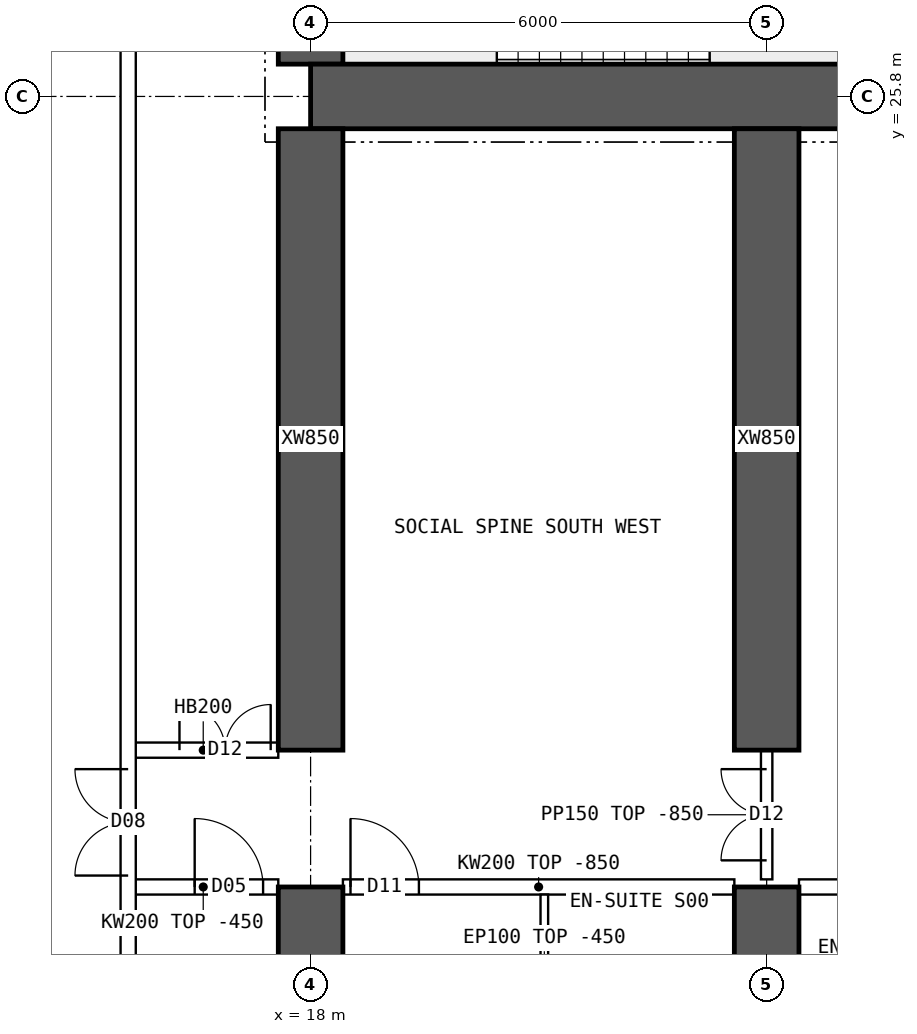
"""IFC4 building model, lengths in metres.
Left out: names, types, materials, properties, quantities, classifications, styles, units other than length and angle.
Written with IfcOpenShell. Run it as: python <this file> out.ifc"""

import sys

from ifc_helpers import new_model, si_unit, direction, frame, frame_2d, origin, place, context, subcontext, project, spatial, polyline, rectangle, outline, extrude, element, fill, save


model = new_model("IFC4")
c1 = context("Model", 3, precision=1e-05, world=origin(), true_north=direction((0.0, 1.0)))
c2 = subcontext(c1, "Body", "Model", "MODEL_VIEW")
j1 = project(units=[si_unit("LENGTHUNIT", "METRE"), si_unit("PLANEANGLEUNIT", "RADIAN")], contexts=[c1])
p1 = place(None, origin())
s1 = spatial("IfcSite", under=j1, at=p1, CompositionType="ELEMENT")
p2 = place(p1, origin())
s2 = spatial("IfcBuilding", under=s1, at=p2, CompositionType="ELEMENT")
p3 = place(p2, frame((0.0, 0.0, 189.85)))
s3 = spatial("IfcBuildingStorey", under=s2, at=p3, CompositionType="ELEMENT", Elevation=189.85)
p4 = place(p3, frame((18.0, 25.8, 0.0), z_axis=(0.0, 0.0, 1.0), x_axis=(1.0, 0.0, 0.0)))
e1 = element("IfcWall", 1, at=p4, inside=s3, PredefinedType="SHEAR", context=c2, shape_type="SweptSolid", body=[
    extrude(rectangle(XDim=48.0, YDim=0.85, at=frame_2d((24.0, 0.0))), origin(), (0.0, 0.0, 1.0), 3.75),
])
p5 = place(p3, frame((18.0, 26.225, 0.0), z_axis=(0.0, 0.0, 1.0), x_axis=(0.0, 1.0, 0.0)))
e2 = element("IfcWall", 2, at=p5, inside=s3, PredefinedType="SHEAR", context=c2, shape_type="SweptSolid", body=[
    extrude(rectangle(XDim=11.55, YDim=0.85, at=frame_2d((5.775, 0.0))), origin(), (0.0, 0.0, 1.0), 3.75),
])
p6 = place(p5, frame((5.075, 0.0, 0.0)))
e3 = element("IfcOpeningElement", 3, at=p6, cuts=e2, PredefinedType="OPENING", context=c2, shape_type="SweptSolid", body=[
    extrude(rectangle(XDim=1.2, YDim=2.1, at=frame_2d((0.6, 1.05))), frame((0.0, 0.435, 0.0), z_axis=(0.0, -1.0, 0.0), x_axis=(1.0, 0.0, 0.0)), (0.0, 0.0, 1.0), 0.87),
])
p7 = place(p3, frame((18.0, 10.0, 0.0), z_axis=(0.0, 0.0, 1.0), x_axis=(0.0, 1.0, 0.0)))
e4 = element("IfcWall", 4, at=p7, inside=s3, PredefinedType="SHEAR", context=c2, shape_type="SweptSolid", body=[
    extrude(rectangle(XDim=5.4, YDim=0.85, at=frame_2d((2.7, 0.0))), origin(), (0.0, 0.0, 1.0), 3.75),
])
p8 = place(p3, frame((18.0, 17.2, 0.0), z_axis=(0.0, 0.0, 1.0), x_axis=(0.0, 1.0, 0.0)))
e5 = element("IfcWall", 5, at=p8, inside=s3, PredefinedType="SHEAR", context=c2, shape_type="SweptSolid", body=[
    extrude(rectangle(XDim=8.175, YDim=0.85, at=frame_2d((4.087, 0.0))), origin(), (0.0, 0.0, 1.0), 3.75),
])
p9 = place(p3, frame((24.0, 10.0, 0.0), z_axis=(0.0, 0.0, 1.0), x_axis=(0.0, 1.0, 0.0)))
e6 = element("IfcWall", 6, at=p9, inside=s3, PredefinedType="SHEAR", context=c2, shape_type="SweptSolid", body=[
    extrude(rectangle(XDim=5.4, YDim=0.85, at=frame_2d((2.7, 0.0))), origin(), (0.0, 0.0, 1.0), 3.75),
])
p10 = place(p3, frame((24.0, 17.2, 0.0), z_axis=(0.0, 0.0, 1.0), x_axis=(0.0, 1.0, 0.0)))
e7 = element("IfcWall", 7, at=p10, inside=s3, PredefinedType="SHEAR", context=c2, shape_type="SweptSolid", body=[
    extrude(rectangle(XDim=8.175, YDim=0.85, at=frame_2d((4.087, 0.0))), origin(), (0.0, 0.0, 1.0), 3.75),
])
p11 = place(p3, frame((15.6, 15.4, 0.0), z_axis=(0.0, 0.0, 1.0), x_axis=(1.0, 0.0, 0.0)))
e8 = element("IfcWall", 8, at=p11, inside=s3, PredefinedType="SOLIDWALL", context=c2, shape_type="SweptSolid", body=[
    extrude(rectangle(XDim=1.975, YDim=0.2, at=frame_2d((0.987, 0.0))), origin(), (0.0, 0.0, 1.0), 3.3),
])
p12 = place(p11, frame((0.875, 0.0, 0.0)))
e9 = element("IfcOpeningElement", 9, at=p12, cuts=e8, PredefinedType="OPENING", context=c2, shape_type="SweptSolid", body=[
    extrude(rectangle(XDim=0.9, YDim=2.1, at=frame_2d((0.45, 1.05))), frame((0.0, 0.11, 0.0), z_axis=(0.0, -1.0, 0.0), x_axis=(1.0, 0.0, 0.0)), (0.0, 0.0, 1.0), 0.22),
])
p13 = place(p3, frame((15.6, 17.2, 0.0), z_axis=(0.0, 0.0, 1.0), x_axis=(1.0, 0.0, 0.0)))
e10 = element("IfcWall", 10, at=p13, inside=s3, PredefinedType="SOLIDWALL", context=c2, shape_type="SweptSolid", body=[
    extrude(rectangle(XDim=1.975, YDim=0.2, at=frame_2d((0.987, 0.0))), origin(), (0.0, 0.0, 1.0), 3.3),
])
p14 = place(p13, frame((0.675, 0.0, 0.0)))
e11 = element("IfcOpeningElement", 11, at=p14, cuts=e10, PredefinedType="OPENING", context=c2, shape_type="SweptSolid", body=[
    extrude(rectangle(XDim=1.2, YDim=2.1, at=frame_2d((0.6, 1.05))), frame((0.0, 0.11, 0.0), z_axis=(0.0, -1.0, 0.0), x_axis=(1.0, 0.0, 0.0)), (0.0, 0.0, 1.0), 0.22),
])
p15 = place(p3, frame((18.425, 15.4, 0.0), z_axis=(0.0, 0.0, 1.0), x_axis=(1.0, 0.0, 0.0)))
e12 = element("IfcWall", 12, at=p15, inside=s3, PredefinedType="SOLIDWALL", context=c2, shape_type="SweptSolid", body=[
    extrude(outline(polyline([(0.0, 0.0), (5.15, 0.0), (5.15, 2.9), (0.0, 2.9), (0.0, 0.0)])), frame((0.0, 0.1, 0.0), z_axis=(0.0, -1.0, 0.0), x_axis=(1.0, 0.0, 0.0)), (0.0, 0.0, 1.0), 0.2),
])
p16 = place(p15, frame((0.1, 0.0, 0.0)))
e13 = element("IfcOpeningElement", 13, at=p16, cuts=e12, PredefinedType="OPENING", context=c2, shape_type="SweptSolid", body=[
    extrude(rectangle(XDim=0.9, YDim=2.1, at=frame_2d((0.45, 1.05))), frame((0.0, 0.11, 0.0), z_axis=(0.0, -1.0, 0.0), x_axis=(1.0, 0.0, 0.0)), (0.0, 0.0, 1.0), 0.22),
])
p17 = place(p3, frame((24.425, 15.4, 0.0), z_axis=(0.0, 0.0, 1.0), x_axis=(1.0, 0.0, 0.0)))
e14 = element("IfcWall", 14, at=p17, inside=s3, PredefinedType="SOLIDWALL", context=c2, shape_type="SweptSolid", body=[
    extrude(outline(polyline([(0.0, 0.0), (5.15, 0.0), (5.15, 2.9), (0.0, 2.9), (0.0, 0.0)])), frame((0.0, 0.1, 0.0), z_axis=(0.0, -1.0, 0.0), x_axis=(1.0, 0.0, 0.0)), (0.0, 0.0, 1.0), 0.2),
])
p18 = place(p17, frame((1.3, 0.0, 0.0)))
e15 = element("IfcOpeningElement", 15, at=p18, cuts=e14, PredefinedType="OPENING", context=c2, shape_type="SweptSolid", body=[
    extrude(rectangle(XDim=0.9, YDim=2.1, at=frame_2d((0.45, 1.05))), frame((0.0, 0.11, 0.0), z_axis=(0.0, -1.0, 0.0), x_axis=(1.0, 0.0, 0.0)), (0.0, 0.0, 1.0), 0.22),
])
p19 = place(p17, frame((2.75, 0.0, 0.0)))
e16 = element("IfcOpeningElement", 16, at=p19, cuts=e14, PredefinedType="OPENING", context=c2, shape_type="SweptSolid", body=[
    extrude(rectangle(XDim=0.9, YDim=2.1, at=frame_2d((0.45, 1.05))), frame((0.0, 0.11, 0.0), z_axis=(0.0, -1.0, 0.0), x_axis=(1.0, 0.0, 0.0)), (0.0, 0.0, 1.0), 0.22),
])
p20 = place(p3, frame((21.075, 13.55, 0.0), z_axis=(0.0, 0.0, 1.0), x_axis=(0.0, 1.0, 0.0)))
e17 = element("IfcWall", 17, at=p20, inside=s3, PredefinedType="PARTITIONING", context=c2, shape_type="SweptSolid", body=[
    extrude(outline(polyline([(0.0, 0.0), (1.75, 0.0), (1.75, 2.9), (1.702, 2.9), (1.7, 3.3), (0.0, 3.3), (0.0, 0.0)])), frame((0.0, 0.05, 0.0), z_axis=(0.0, -1.0, 0.0), x_axis=(1.0, 0.0, 0.0)), (0.0, 0.0, 1.0), 0.1),
])
p21 = place(p3, frame((24.0, 15.5, 0.0), z_axis=(0.0, 0.0, 1.0), x_axis=(0.0, 1.0, 0.0)))
e18 = element("IfcWall", 18, at=p21, inside=s3, PredefinedType="PARTITIONING", context=c2, shape_type="SweptSolid", body=[
    extrude(outline(polyline([(0.0, 0.0), (1.7, 0.0), (1.7, 2.9), (0.0, 2.9), (0.0, 0.0)])), frame((0.0, 0.075, 0.0), z_axis=(0.0, -1.0, 0.0), x_axis=(1.0, 0.0, 0.0)), (0.0, 0.0, 1.0), 0.15),
])
p22 = place(p21, frame((0.25, 0.0, 0.0)))
e19 = element("IfcOpeningElement", 19, at=p22, cuts=e18, PredefinedType="OPENING", context=c2, shape_type="SweptSolid", body=[
    extrude(rectangle(XDim=1.2, YDim=2.1, at=frame_2d((0.6, 1.05))), frame((0.0, 0.085, 0.0), z_axis=(0.0, -1.0, 0.0), x_axis=(1.0, 0.0, 0.0)), (0.0, 0.0, 1.0), 0.17),
])
p23 = place(p3, frame((15.6, 10.446, 0.0), z_axis=(0.0, 0.0, 1.0), x_axis=(0.0, 1.0, 0.0)))
e20 = element("IfcWall", 20, at=p23, inside=s3, PredefinedType="SOLIDWALL", context=c2, shape_type="SweptSolid", body=[
    extrude(rectangle(XDim=43.107, YDim=0.2, at=frame_2d((21.554, 0.0))), origin(), (0.0, 0.0, 1.0), 3.3),
])
p24 = place(p23, frame((5.104, 0.0, 0.0)))
e21 = element("IfcOpeningElement", 21, at=p24, cuts=e20, PredefinedType="OPENING", context=c2, shape_type="SweptSolid", body=[
    extrude(rectangle(XDim=1.4, YDim=2.1, at=frame_2d((0.7, 1.05))), frame((0.0, 0.11, 0.0), z_axis=(0.0, -1.0, 0.0), x_axis=(1.0, 0.0, 0.0)), (0.0, 0.0, 1.0), 0.22),
])
p25 = place(p23, frame((36.504, 0.0, 0.0)))
e22 = element("IfcOpeningElement", 22, at=p25, cuts=e20, PredefinedType="OPENING", context=c2, shape_type="SweptSolid", body=[
    extrude(rectangle(XDim=1.4, YDim=2.1, at=frame_2d((0.7, 1.05))), frame((0.0, 0.11, 0.0), z_axis=(0.0, -1.0, 0.0), x_axis=(1.0, 0.0, 0.0)), (0.0, 0.0, 1.0), 0.22),
])
p26 = place(p14, origin())
e23 = element("IfcDoor", 23, at=p26, inside=s3, OperationType="DOUBLE_DOOR_SINGLE_SWING", PredefinedType="DOOR", context=c2, shape_type="SweptSolid", body=[
    extrude(rectangle(XDim=1.2, YDim=2.1, at=frame_2d((0.6, 1.05))), frame((0.0, 0.025, 0.0), z_axis=(0.0, -1.0, 0.0), x_axis=(1.0, 0.0, 0.0)), (0.0, 0.0, 1.0), 0.05),
])
fill(e11, e23)
p27 = place(p16, origin())
e24 = element("IfcDoor", 24, at=p27, inside=s3, OperationType="SINGLE_SWING_LEFT", PredefinedType="DOOR", context=c2, shape_type="SweptSolid", body=[
    extrude(rectangle(XDim=0.9, YDim=2.1, at=frame_2d((0.45, 1.05))), frame((0.0, 0.025, 0.0), z_axis=(0.0, -1.0, 0.0), x_axis=(1.0, 0.0, 0.0)), (0.0, 0.0, 1.0), 0.05),
])
fill(e13, e24)
p28 = place(p22, origin())
e25 = element("IfcDoor", 25, at=p28, inside=s3, OperationType="DOUBLE_DOOR_SINGLE_SWING", PredefinedType="DOOR", context=c2, shape_type="SweptSolid", body=[
    extrude(rectangle(XDim=1.2, YDim=2.1, at=frame_2d((0.6, 1.05))), frame((0.0, 0.025, 0.0), z_axis=(0.0, -1.0, 0.0), x_axis=(1.0, 0.0, 0.0)), (0.0, 0.0, 1.0), 0.05),
])
fill(e19, e25)
p29 = place(p24, origin())
e26 = element("IfcDoor", 26, at=p29, inside=s3, OperationType="DOUBLE_DOOR_SINGLE_SWING", PredefinedType="DOOR", context=c2, shape_type="SweptSolid", body=[
    extrude(rectangle(XDim=1.4, YDim=2.1, at=frame_2d((0.7, 1.05))), frame((0.0, 0.025, 0.0), z_axis=(0.0, -1.0, 0.0), x_axis=(1.0, 0.0, 0.0)), (0.0, 0.0, 1.0), 0.05),
])
fill(e21, e26)
p30 = place(p12, origin())
e27 = element("IfcDoor", 27, at=p30, inside=s3, OperationType="SINGLE_SWING_LEFT", PredefinedType="DOOR", context=c2, shape_type="SweptSolid", body=[
    extrude(rectangle(XDim=0.9, YDim=2.1, at=frame_2d((0.45, 1.05))), frame((0.0, 0.025, 0.0), z_axis=(0.0, -1.0, 0.0), x_axis=(1.0, 0.0, 0.0)), (0.0, 0.0, 1.0), 0.05),
])
fill(e9, e27)
save(model, sys.argv[1])
